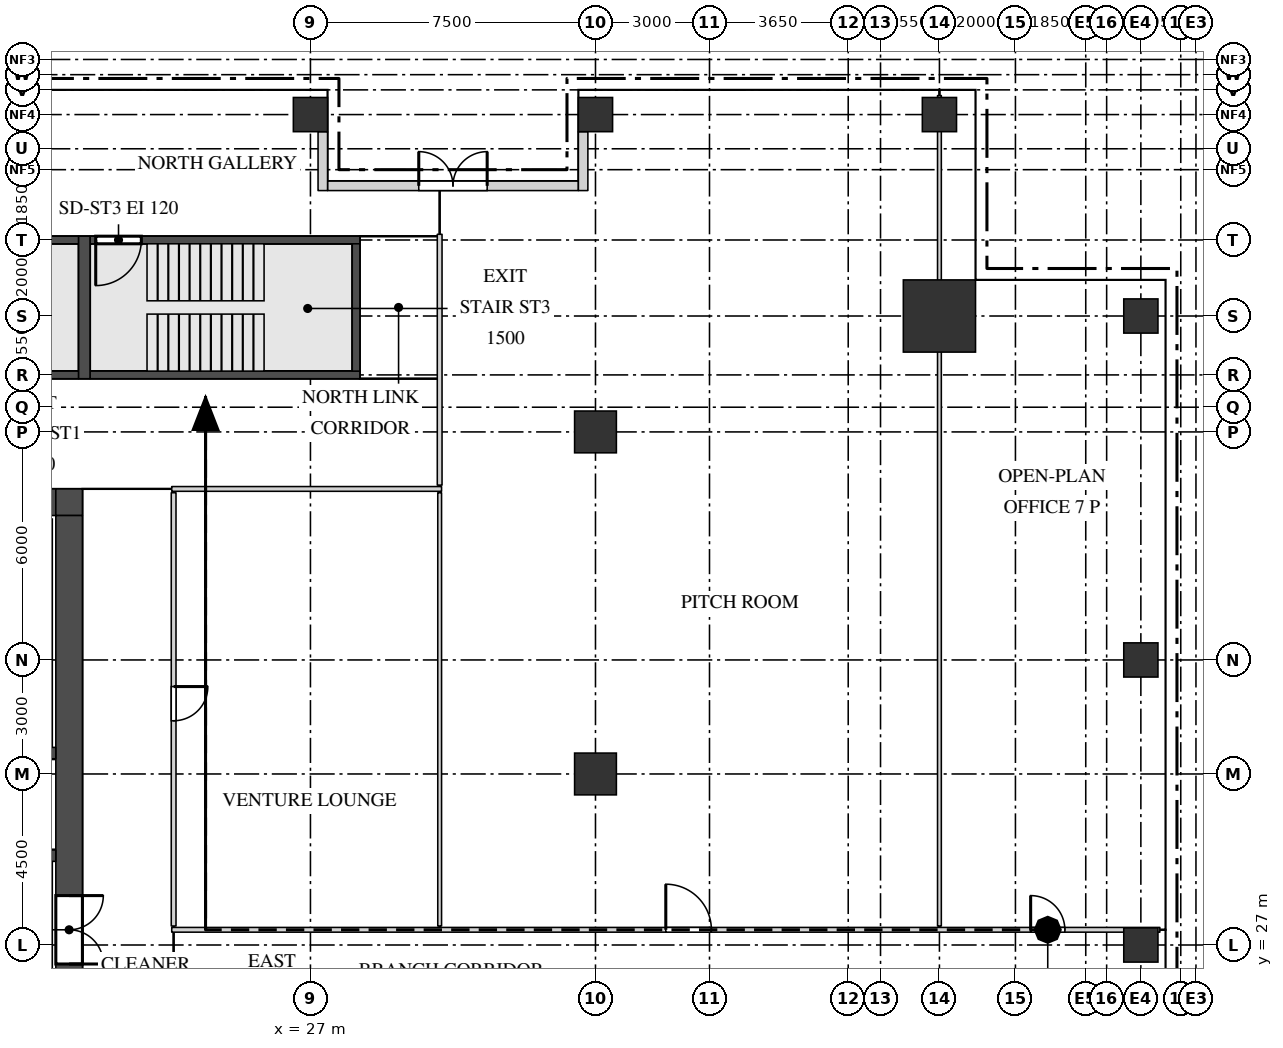
"""IFC4 building model, lengths in metres.
Left out: names, types, materials, properties, quantities, classifications, styles, units other than length and angle.
Written with IfcOpenShell. Run it as: python <this file> out.ifc"""

import sys

from ifc_helpers import new_model, si_unit, direction, frame, frame_2d, origin, origin_2d, place, context, subcontext, project, spatial, rectangle, extrude, source, transform, mapped, element, fill, save


model = new_model("IFC4")
c1 = context("Model", 3, precision=1e-05, world=origin(), true_north=direction((0.0, 1.0)))
c2 = subcontext(c1, "Body", "Model", "MODEL_VIEW")
j1 = project(units=[si_unit("LENGTHUNIT", "METRE"), si_unit("PLANEANGLEUNIT", "RADIAN")], contexts=[c1])
p1 = place(None, origin())
s1 = spatial("IfcSite", under=j1, at=p1, CompositionType="ELEMENT")
p2 = place(p1, origin())
s2 = spatial("IfcBuilding", under=s1, at=p2, CompositionType="ELEMENT")
p3 = place(p2, frame((0.0, 0.0, 234.2)))
s3 = spatial("IfcBuildingStorey", under=s2, at=p3, CompositionType="ELEMENT", Elevation=234.2)
m1 = source(origin(), c2, "Body", "SweptSolid", [
    extrude(rectangle(XDim=13.6, YDim=0.7, at=frame_2d((6.8, 0.0))), origin(), (0.0, 0.0, 1.0), 3.75),
])
p4 = place(p3, frame((6.7, 38.65, 0.0), z_axis=(0.0, 0.0, 1.0), x_axis=(1.0, 0.0, 0.0)))
e1 = element("IfcWall", 1, at=p4, inside=s3, PredefinedType="SHEAR", context=c2, shape_type="MappedRepresentation", body=[
    mapped(m1, transform((0.0, 0.0, 0.0))),
])
m2 = source(origin(), c2, "Body", "SweptSolid", [
    extrude(rectangle(XDim=0.9, YDim=2.1, at=frame_2d((0.45, 1.05))), frame((0.0, 0.36, 0.0), z_axis=(0.0, -1.0, 0.0), x_axis=(1.0, 0.0, 0.0)), (0.0, 0.0, 1.0), 0.72),
])
p5 = place(p4, frame((1.85, 0.0, 0.0)))
e2 = element("IfcOpeningElement", 2, at=p5, cuts=e1, PredefinedType="OPENING", context=c2, shape_type="MappedRepresentation", body=[
    mapped(m2, transform((0.0, 0.0, 0.0))),
])
p6 = place(p4, frame((6.3, 0.0, 0.0)))
e3 = element("IfcOpeningElement", 3, at=p6, cuts=e1, PredefinedType="OPENING", context=c2, shape_type="MappedRepresentation", body=[
    mapped(m2, transform((0.0, 0.0, 0.0))),
])
p7 = place(p4, frame((10.8, 0.0, 0.0)))
e4 = element("IfcOpeningElement", 4, at=p7, cuts=e1, PredefinedType="OPENING", context=c2, shape_type="MappedRepresentation", body=[
    mapped(m2, transform((0.0, 0.0, 0.0))),
])
m3 = source(origin(), c2, "Body", "SweptSolid", [
    extrude(rectangle(XDim=0.7, YDim=0.7, at=frame_2d((0.35, 0.0))), origin(), (0.0, 0.0, 1.0), 3.75),
])
p8 = place(p3, frame((20.3, 38.65, 0.0), z_axis=(0.0, 0.0, 1.0), x_axis=(1.0, 0.0, 0.0)))
e5 = element("IfcWall", 5, at=p8, inside=s3, PredefinedType="SHEAR", context=c2, shape_type="MappedRepresentation", body=[
    mapped(m3, transform((0.0, 0.0, 0.0))),
])
m4 = source(origin(), c2, "Body", "SweptSolid", [
    extrude(rectangle(XDim=22.6, YDim=0.7, at=frame_2d((11.3, 0.0))), origin(), (0.0, 0.0, 1.0), 3.75),
])
p9 = place(p3, frame((20.65, 15.7, 0.0), z_axis=(0.0, 0.0, 1.0), x_axis=(0.0, 1.0, 0.0)))
e6 = element("IfcWall", 6, at=p9, inside=s3, PredefinedType="SHEAR", context=c2, shape_type="MappedRepresentation", body=[
    mapped(m4, transform((0.0, 0.0, 0.0))),
])
m5 = source(origin(), c2, "Body", "SweptSolid", [
    extrude(rectangle(XDim=1.8, YDim=2.1, at=frame_2d((0.9, 1.05))), frame((0.0, 0.36, 0.0), z_axis=(0.0, -1.0, 0.0), x_axis=(1.0, 0.0, 0.0)), (0.0, 0.0, 1.0), 0.72),
])
p10 = place(p9, frame((10.8, 0.0, 0.0)))
e7 = element("IfcOpeningElement", 7, at=p10, cuts=e6, PredefinedType="OPENING", context=c2, shape_type="MappedRepresentation", body=[
    mapped(m5, transform((0.0, 0.0, 0.0))),
])
p11 = place(p9, frame((0.45, 0.0, 0.0)))
e8 = element("IfcOpeningElement", 8, at=p11, cuts=e6, PredefinedType="OPENING", context=c2, shape_type="MappedRepresentation", body=[
    mapped(m2, transform((0.0, 0.0, 0.0))),
])
m6 = source(origin(), c2, "Body", "SweptSolid", [
    extrude(rectangle(XDim=1.0, YDim=2.1, at=frame_2d((0.5, 1.05))), frame((0.0, 0.36, 0.0), z_axis=(0.0, -1.0, 0.0), x_axis=(1.0, 0.0, 0.0)), (0.0, 0.0, 1.0), 0.72),
])
p12 = place(p9, frame((2.2, 0.0, 0.0)))
e9 = element("IfcOpeningElement", 9, at=p12, cuts=e6, PredefinedType="OPENING", context=c2, shape_type="MappedRepresentation", body=[
    mapped(m6, transform((0.0, 0.0, 0.0))),
])
p13 = place(p9, frame((5.0, 0.0, 0.0)))
e10 = element("IfcOpeningElement", 10, at=p13, cuts=e6, PredefinedType="OPENING", context=c2, shape_type="MappedRepresentation", body=[
    mapped(m2, transform((0.0, 0.0, 0.0))),
])
m7 = source(origin(), c2, "Body", "SweptSolid", [
    extrude(rectangle(XDim=7.0, YDim=0.2, at=frame_2d((3.5, 0.0))), origin(), (0.0, 0.0, 1.0), 3.75),
])
p14 = place(p3, frame((13.9, 45.55, 0.0), z_axis=(0.0, 0.0, 1.0), x_axis=(1.0, 0.0, 0.0)))
e11 = element("IfcWall", 11, at=p14, inside=s3, PredefinedType="SHEAR", context=c2, shape_type="MappedRepresentation", body=[
    mapped(m7, transform((0.0, 0.0, 0.0))),
])
m8 = source(origin(), c2, "Body", "SweptSolid", [
    extrude(rectangle(XDim=1.2, YDim=2.1, at=frame_2d((0.6, 1.05))), frame((0.0, 0.11, 0.0), z_axis=(0.0, -1.0, 0.0), x_axis=(1.0, 0.0, 0.0)), (0.0, 0.0, 1.0), 0.22),
])
p15 = place(p14, frame((0.35, 0.0, 0.0)))
e12 = element("IfcOpeningElement", 12, at=p15, cuts=e11, PredefinedType="OPENING", context=c2, shape_type="MappedRepresentation", body=[
    mapped(m8, transform((0.0, 0.0, 0.0))),
])
p16 = place(p3, frame((13.9, 42.0, 0.0), z_axis=(0.0, 0.0, 1.0), x_axis=(1.0, 0.0, 0.0)))
e13 = element("IfcWall", 13, at=p16, inside=s3, PredefinedType="SHEAR", context=c2, shape_type="MappedRepresentation", body=[
    mapped(m7, transform((0.0, 0.0, 0.0))),
])
m9 = source(origin(), c2, "Body", "SweptSolid", [
    extrude(rectangle(XDim=7.1, YDim=0.2, at=frame_2d((3.55, 0.0))), origin(), (0.0, 0.0, 1.0), 3.75),
])
p17 = place(p3, frame((21.2, 45.55, 0.0), z_axis=(0.0, 0.0, 1.0), x_axis=(1.0, 0.0, 0.0)))
e14 = element("IfcWall", 14, at=p17, inside=s3, PredefinedType="SHEAR", context=c2, shape_type="MappedRepresentation", body=[
    mapped(m9, transform((0.0, 0.0, 0.0))),
])
p18 = place(p17, frame((0.15, 0.0, 0.0)))
e15 = element("IfcOpeningElement", 15, at=p18, cuts=e14, PredefinedType="OPENING", context=c2, shape_type="MappedRepresentation", body=[
    mapped(m8, transform((0.0, 0.0, 0.0))),
])
p19 = place(p3, frame((21.2, 42.0, 0.0), z_axis=(0.0, 0.0, 1.0), x_axis=(1.0, 0.0, 0.0)))
e16 = element("IfcWall", 16, at=p19, inside=s3, PredefinedType="SHEAR", context=c2, shape_type="MappedRepresentation", body=[
    mapped(m9, transform((0.0, 0.0, 0.0))),
])
m10 = source(origin(), c2, "Body", "SweptSolid", [
    extrude(rectangle(XDim=3.75, YDim=0.3, at=frame_2d((1.875, 0.0))), origin(), (0.0, 0.0, 1.0), 3.75),
])
p20 = place(p3, frame((21.05, 41.9, 0.0), z_axis=(0.0, 0.0, 1.0), x_axis=(0.0, 1.0, 0.0)))
e17 = element("IfcWall", 17, at=p20, inside=s3, PredefinedType="SHEAR", context=c2, shape_type="MappedRepresentation", body=[
    mapped(m10, transform((0.0, 0.0, 0.0))),
])
m11 = source(origin(), c2, "Body", "SweptSolid", [
    extrude(rectangle(XDim=3.35, YDim=0.2, at=frame_2d((1.675, 0.0))), origin(), (0.0, 0.0, 1.0), 3.75),
])
p21 = place(p3, frame((28.2, 42.1, 0.0), z_axis=(0.0, 0.0, 1.0), x_axis=(0.0, 1.0, 0.0)))
e18 = element("IfcWall", 18, at=p21, inside=s3, PredefinedType="SHEAR", context=c2, shape_type="MappedRepresentation", body=[
    mapped(m11, transform((0.0, 0.0, 0.0))),
])
m12 = source(origin(), c2, "Body", "SweptSolid", [
    extrude(rectangle(XDim=13.6, YDim=0.3, at=frame_2d((6.8, 0.0))), origin(), (0.0, 0.0, 1.0), 3.75),
])
p22 = place(p3, frame((6.7, 32.05, 0.0), z_axis=(0.0, 0.0, 1.0), x_axis=(1.0, 0.0, 0.0)))
e19 = element("IfcWall", 19, at=p22, inside=s3, PredefinedType="STANDARD", context=c2, shape_type="MappedRepresentation", body=[
    mapped(m12, transform((0.0, 0.0, 0.0))),
])
p23 = place(p3, frame((6.7, 29.35, 0.0), z_axis=(0.0, 0.0, 1.0), x_axis=(1.0, 0.0, 0.0)))
e20 = element("IfcWall", 20, at=p23, inside=s3, PredefinedType="STANDARD", context=c2, shape_type="MappedRepresentation", body=[
    mapped(m12, transform((0.0, 0.0, 0.0))),
])
m13 = source(origin(), c2, "Body", "SweptSolid", [
    extrude(rectangle(XDim=1.2, YDim=2.1, at=frame_2d((0.6, 1.05))), frame((0.0, 0.16, 0.0), z_axis=(0.0, -1.0, 0.0), x_axis=(1.0, 0.0, 0.0)), (0.0, 0.0, 1.0), 0.32),
])
p24 = place(p23, frame((1.05, 0.0, 0.0)))
e21 = element("IfcOpeningElement", 21, at=p24, cuts=e20, PredefinedType="OPENING", context=c2, shape_type="MappedRepresentation", body=[
    mapped(m13, transform((0.0, 0.0, 0.0))),
])
p25 = place(p23, frame((3.6, 0.0, 0.0)))
e22 = element("IfcOpeningElement", 22, at=p25, cuts=e20, PredefinedType="OPENING", context=c2, shape_type="MappedRepresentation", body=[
    mapped(m13, transform((0.0, 0.0, 0.0))),
])
p26 = place(p23, frame((6.15, 0.0, 0.0)))
e23 = element("IfcOpeningElement", 23, at=p26, cuts=e20, PredefinedType="OPENING", context=c2, shape_type="MappedRepresentation", body=[
    mapped(m13, transform((0.0, 0.0, 0.0))),
])
p27 = place(p23, frame((8.7, 0.0, 0.0)))
e24 = element("IfcOpeningElement", 24, at=p27, cuts=e20, PredefinedType="OPENING", context=c2, shape_type="MappedRepresentation", body=[
    mapped(m13, transform((0.0, 0.0, 0.0))),
])
p28 = place(p23, frame((11.25, 0.0, 0.0)))
e25 = element("IfcOpeningElement", 25, at=p28, cuts=e20, PredefinedType="OPENING", context=c2, shape_type="MappedRepresentation", body=[
    mapped(m13, transform((0.0, 0.0, 0.0))),
])
m14 = source(origin(), c2, "Body", "SweptSolid", [
    extrude(rectangle(XDim=1.9, YDim=1.9, at=origin_2d()), origin(), (0.0, 0.0, 1.0), 4.0),
])
p29 = place(p3, frame((43.55, 43.55, 0.0), z_axis=(0.0, 0.0, 1.0), x_axis=(1.0, 0.0, 0.0)))
e26 = element("IfcColumn", 26, at=p29, inside=s3, PredefinedType="COLUMN", context=c2, shape_type="MappedRepresentation", body=[
    mapped(m14, transform((0.0, 0.0, 0.0))),
])
m15 = source(origin(), c2, "Body", "SweptSolid", [
    extrude(rectangle(XDim=0.9, YDim=0.9, at=origin_2d()), origin(), (0.0, 0.0, 1.0), 3.75),
])
for number, where, z_axis, x_axis in (
    (27, (48.85, 27.0, 0.0), (0.0, 0.0, 1.0), (1.0, 0.0, 0.0)),
    (28, (48.85, 34.5, 0.0), (0.0, 0.0, 1.0), (1.0, 0.0, 0.0)),
    (29, (48.85, 43.55, 0.0), (0.0, 0.0, 1.0), (1.0, 0.0, 0.0)),
    (30, (27.0, 48.85, 0.0), (0.0, 0.0, 1.0), (1.0, 0.0, 0.0)),
    (31, (34.5, 48.85, 0.0), (0.0, 0.0, 1.0), (1.0, 0.0, 0.0)),
    (32, (43.55, 48.85, 0.0), (0.0, 0.0, 1.0), (1.0, 0.0, 0.0)),
):
    element("IfcColumn", number, at=place(p3, frame(where, z_axis=z_axis, x_axis=x_axis)), inside=s3, PredefinedType="COLUMN", context=c2, shape_type="MappedRepresentation", body=[
        mapped(m15, transform((0.0, 0.0, 0.0))),
    ])
m16 = source(origin(), c2, "Body", "SweptSolid", [
    extrude(rectangle(XDim=1.1, YDim=1.1, at=origin_2d()), origin(), (0.0, 0.0, 1.0), 3.75),
])
for number, where, z_axis, x_axis in (
    (33, (34.5, 31.5, 0.0), (0.0, 0.0, 1.0), (1.0, 0.0, 0.0)),
    (34, (34.5, 40.5, 0.0), (0.0, 0.0, 1.0), (1.0, 0.0, 0.0)),
):
    element("IfcColumn", number, at=place(p3, frame(where, z_axis=z_axis, x_axis=x_axis)), inside=s3, PredefinedType="COLUMN", context=c2, shape_type="MappedRepresentation", body=[
        mapped(m16, transform((0.0, 0.0, 0.0))),
    ])
m17 = source(origin(), c2, "Body", "SweptSolid", [
    extrude(rectangle(XDim=6.6, YDim=0.25, at=frame_2d((3.3, 0.0))), origin(), (0.0, 0.0, 1.0), 3.75),
])
p30 = place(p3, frame((27.45, 46.975, 0.0), z_axis=(0.0, 0.0, 1.0), x_axis=(1.0, 0.0, 0.0)))
e35 = element("IfcWall", 35, at=p30, inside=s3, PredefinedType="SOLIDWALL", context=c2, shape_type="MappedRepresentation", body=[
    mapped(m17, transform((0.0, 0.0, 0.0))),
])
m18 = source(origin(), c2, "Body", "SweptSolid", [
    extrude(rectangle(XDim=1.75, YDim=2.4, at=frame_2d((0.875, 1.2))), frame((0.0, 0.135, 0.0), z_axis=(0.0, -1.0, 0.0), x_axis=(1.0, 0.0, 0.0)), (0.0, 0.0, 1.0), 0.27),
])
p31 = place(p30, frame((0.35, 0.0, 0.0)))
e36 = element("IfcOpeningElement", 36, at=p31, cuts=e35, PredefinedType="OPENING", context=c2, shape_type="MappedRepresentation", body=[
    mapped(m18, transform((0.0, 0.0, 0.0))),
])
p32 = place(p30, frame((4.5, 0.0, 0.0)))
e37 = element("IfcOpeningElement", 37, at=p32, cuts=e35, PredefinedType="OPENING", context=c2, shape_type="MappedRepresentation", body=[
    mapped(m18, transform((0.0, 0.0, 0.0))),
])
m19 = source(origin(), c2, "Body", "SweptSolid", [
    extrude(rectangle(XDim=1.8, YDim=2.4, at=frame_2d((0.9, 1.2))), frame((0.0, 0.135, 0.0), z_axis=(0.0, -1.0, 0.0), x_axis=(1.0, 0.0, 0.0)), (0.0, 0.0, 1.0), 0.27),
])
p33 = place(p30, frame((2.4, 0.0, 0.0)))
e38 = element("IfcOpeningElement", 38, at=p33, cuts=e35, PredefinedType="OPENING", context=c2, shape_type="MappedRepresentation", body=[
    mapped(m19, transform((0.0, 0.0, 0.0))),
])
m20 = source(origin(), c2, "Body", "SweptSolid", [
    extrude(rectangle(XDim=1.55, YDim=0.25, at=frame_2d((0.775, 0.0))), origin(), (0.0, 0.0, 1.0), 3.45),
])
for number, where, z_axis, x_axis in (
    (39, (27.325, 48.4, 0.0), (0.0, 0.0, 1.0), (0.0, -1.0, 0.0)),
    (40, (34.175, 48.4, 0.0), (0.0, 0.0, 1.0), (0.0, -1.0, 0.0)),
):
    element("IfcWall", number, at=place(p3, frame(where, z_axis=z_axis, x_axis=x_axis)), inside=s3, PredefinedType="SOLIDWALL", context=c2, shape_type="MappedRepresentation", body=[
        mapped(m20, transform((0.0, 0.0, 0.0))),
    ])
m21 = source(origin(), c2, "Body", "SweptSolid", [
    extrude(rectangle(XDim=26.0, YDim=0.125, at=frame_2d((13.0, 0.0))), origin(), (0.0, 0.0, 1.0), 3.8),
])
p34 = place(p3, frame((23.35, 27.4, 0.0), z_axis=(0.0, 0.0, 1.0), x_axis=(1.0, 0.0, 0.0)))
e41 = element("IfcWall", 41, at=p34, inside=s3, PredefinedType="PARTITIONING", context=c2, shape_type="MappedRepresentation", body=[
    mapped(m21, transform((0.0, 0.0, 0.0))),
])
m22 = source(origin(), c2, "Body", "SweptSolid", [
    extrude(rectangle(XDim=1.2, YDim=2.1, at=frame_2d((0.6, 1.05))), frame((0.0, 0.073, 0.0), z_axis=(0.0, -1.0, 0.0), x_axis=(1.0, 0.0, 0.0)), (0.0, 0.0, 1.0), 0.145),
])
p35 = place(p34, frame((13.0, 0.0, 0.0)))
e42 = element("IfcOpeningElement", 42, at=p35, cuts=e41, PredefinedType="OPENING", context=c2, shape_type="MappedRepresentation", body=[
    mapped(m22, transform((0.0, 0.0, 0.0))),
])
m23 = source(origin(), c2, "Body", "SweptSolid", [
    extrude(rectangle(XDim=0.9, YDim=2.1, at=frame_2d((0.45, 1.05))), frame((0.0, 0.073, 0.0), z_axis=(0.0, -1.0, 0.0), x_axis=(1.0, 0.0, 0.0)), (0.0, 0.0, 1.0), 0.145),
])
p36 = place(p34, frame((22.6, 0.0, 0.0)))
e43 = element("IfcOpeningElement", 43, at=p36, cuts=e41, PredefinedType="OPENING", context=c2, shape_type="MappedRepresentation", body=[
    mapped(m23, transform((0.0, 0.0, 0.0))),
])
m24 = source(origin(), c2, "Body", "SweptSolid", [
    extrude(rectangle(XDim=11.4, YDim=0.125, at=frame_2d((5.7, 0.0))), origin(), (0.0, 0.0, 1.0), 3.8),
])
p37 = place(p3, frame((23.4, 27.5, 0.0), z_axis=(0.0, 0.0, 1.0), x_axis=(0.0, 1.0, 0.0)))
e44 = element("IfcWall", 44, at=p37, inside=s3, PredefinedType="PARTITIONING", context=c2, shape_type="MappedRepresentation", body=[
    mapped(m24, transform((0.0, 0.0, 0.0))),
])
p38 = place(p37, frame((5.4, 0.0, 0.0)))
e45 = element("IfcOpeningElement", 45, at=p38, cuts=e44, PredefinedType="OPENING", context=c2, shape_type="MappedRepresentation", body=[
    mapped(m23, transform((0.0, 0.0, 0.0))),
])
m25 = source(origin(), c2, "Body", "SweptSolid", [
    extrude(rectangle(XDim=11.4, YDim=0.1, at=frame_2d((5.7, 0.0))), origin(), (0.0, 0.0, 1.0), 3.8),
])
p39 = place(p3, frame((30.4, 27.5, 0.0), z_axis=(0.0, 0.0, 1.0), x_axis=(0.0, 1.0, 0.0)))
e46 = element("IfcWall", 46, at=p39, inside=s3, PredefinedType="PARTITIONING", context=c2, shape_type="MappedRepresentation", body=[
    mapped(m25, transform((0.0, 0.0, 0.0))),
])
m26 = source(origin(), c2, "Body", "SweptSolid", [
    extrude(rectangle(XDim=21.85, YDim=0.1, at=frame_2d((10.925, 0.0))), origin(), (0.0, 0.0, 1.0), 3.3),
])
p40 = place(p3, frame((43.55, 27.5, 0.0), z_axis=(0.0, 0.0, 1.0), x_axis=(0.0, 1.0, 0.0)))
e47 = element("IfcWall", 47, at=p40, inside=s3, PredefinedType="PARTITIONING", context=c2, shape_type="MappedRepresentation", body=[
    mapped(m26, transform((0.0, 0.0, 0.0))),
])
m27 = source(origin(), c2, "Body", "SweptSolid", [
    extrude(rectangle(XDim=7.1, YDim=0.125, at=frame_2d((3.55, 0.0))), origin(), (0.0, 0.0, 1.0), 3.8),
])
p41 = place(p3, frame((23.35, 39.0, 0.0), z_axis=(0.0, 0.0, 1.0), x_axis=(1.0, 0.0, 0.0)))
e48 = element("IfcWall", 48, at=p41, inside=s3, PredefinedType="PARTITIONING", context=c2, shape_type="MappedRepresentation", body=[
    mapped(m27, transform((0.0, 0.0, 0.0))),
])
m28 = source(origin(), c2, "Body", "SweptSolid", [
    extrude(rectangle(XDim=6.6, YDim=0.125, at=frame_2d((3.3, 0.0))), origin(), (0.0, 0.0, 1.0), 3.8),
])
p42 = place(p3, frame((30.4, 39.1, 0.0), z_axis=(0.0, 0.0, 1.0), x_axis=(0.0, 1.0, 0.0)))
e49 = element("IfcWall", 49, at=p42, inside=s3, PredefinedType="PARTITIONING", context=c2, shape_type="MappedRepresentation", body=[
    mapped(m28, transform((0.0, 0.0, 0.0))),
])
m29 = source(origin(), c2, "Body", "SweptSolid", [
    extrude(rectangle(XDim=1.75, YDim=2.4, at=frame_2d((0.875, 1.2))), frame((0.0, 0.03, 0.0), z_axis=(0.0, -1.0, 0.0), x_axis=(1.0, 0.0, 0.0)), (0.0, 0.0, 1.0), 0.06),
])
p43 = place(p31, origin())
e50 = element("IfcWindow", 50, at=p43, inside=s3, PartitioningType="SINGLE_PANEL", PredefinedType="WINDOW", context=c2, shape_type="MappedRepresentation", body=[
    mapped(m29, transform((0.0, 0.0, 0.0))),
])
fill(e36, e50)
p44 = place(p32, origin())
e51 = element("IfcWindow", 51, at=p44, inside=s3, PartitioningType="SINGLE_PANEL", PredefinedType="WINDOW", context=c2, shape_type="MappedRepresentation", body=[
    mapped(m29, transform((0.0, 0.0, 0.0))),
])
fill(e37, e51)
m30 = source(origin(), c2, "Body", "SweptSolid", [
    extrude(rectangle(XDim=1.8, YDim=2.4, at=frame_2d((0.9, 1.2))), frame((0.0, 0.025, 0.0), z_axis=(0.0, -1.0, 0.0), x_axis=(1.0, 0.0, 0.0)), (0.0, 0.0, 1.0), 0.05),
])
p45 = place(p33, origin())
e52 = element("IfcDoor", 52, at=p45, inside=s3, OperationType="DOUBLE_DOOR_DOUBLE_SWING", PredefinedType="DOOR", context=c2, shape_type="MappedRepresentation", body=[
    mapped(m30, transform((0.0, 0.0, 0.0))),
])
fill(e38, e52)
m31 = source(origin(), c2, "Body", "SweptSolid", [
    extrude(rectangle(XDim=1.8, YDim=2.1, at=frame_2d((0.9, 1.05))), frame((0.0, 0.3, 0.0), z_axis=(0.0, -1.0, 0.0), x_axis=(1.0, 0.0, 0.0)), (0.0, 0.0, 1.0), 0.6),
])
p46 = place(p10, origin())
e53 = element("IfcDoor", 53, at=p46, inside=s3, OperationType="DOUBLE_DOOR_SINGLE_SWING", PredefinedType="DOOR", context=c2, shape_type="MappedRepresentation", body=[
    mapped(m31, transform((0.0, 0.0, 0.0))),
])
fill(e7, e53)
m32 = source(origin(), c2, "Body", "SweptSolid", [
    extrude(rectangle(XDim=0.9, YDim=2.1, at=frame_2d((0.45, 1.05))), frame((0.0, 0.025, 0.0), z_axis=(0.0, -1.0, 0.0), x_axis=(1.0, 0.0, 0.0)), (0.0, 0.0, 1.0), 0.05),
])
p47 = place(p38, origin())
e54 = element("IfcDoor", 54, at=p47, inside=s3, OperationType="SINGLE_SWING_RIGHT", PredefinedType="DOOR", context=c2, shape_type="MappedRepresentation", body=[
    mapped(m32, transform((0.0, 0.0, 0.0))),
])
fill(e45, e54)
m33 = source(origin(), c2, "Body", "SweptSolid", [
    extrude(rectangle(XDim=1.2, YDim=2.1, at=frame_2d((0.6, 1.05))), frame((0.0, 0.025, 0.0), z_axis=(0.0, -1.0, 0.0), x_axis=(1.0, 0.0, 0.0)), (0.0, 0.0, 1.0), 0.05),
])
p48 = place(p35, origin())
e55 = element("IfcDoor", 55, at=p48, inside=s3, OperationType="SINGLE_SWING_RIGHT", PredefinedType="DOOR", context=c2, shape_type="MappedRepresentation", body=[
    mapped(m33, transform((0.0, 0.0, 0.0))),
])
fill(e42, e55)
p49 = place(p36, origin())
e56 = element("IfcDoor", 56, at=p49, inside=s3, OperationType="SINGLE_SWING_RIGHT", PredefinedType="DOOR", context=c2, shape_type="MappedRepresentation", body=[
    mapped(m32, transform((0.0, 0.0, 0.0))),
])
fill(e43, e56)
p50 = place(p18, origin())
e57 = element("IfcDoor", 57, at=p50, inside=s3, OperationType="SINGLE_SWING_LEFT", PredefinedType="DOOR", context=c2, shape_type="MappedRepresentation", body=[
    mapped(m33, transform((0.0, 0.0, 0.0))),
])
fill(e15, e57)
save(model, sys.argv[1])
